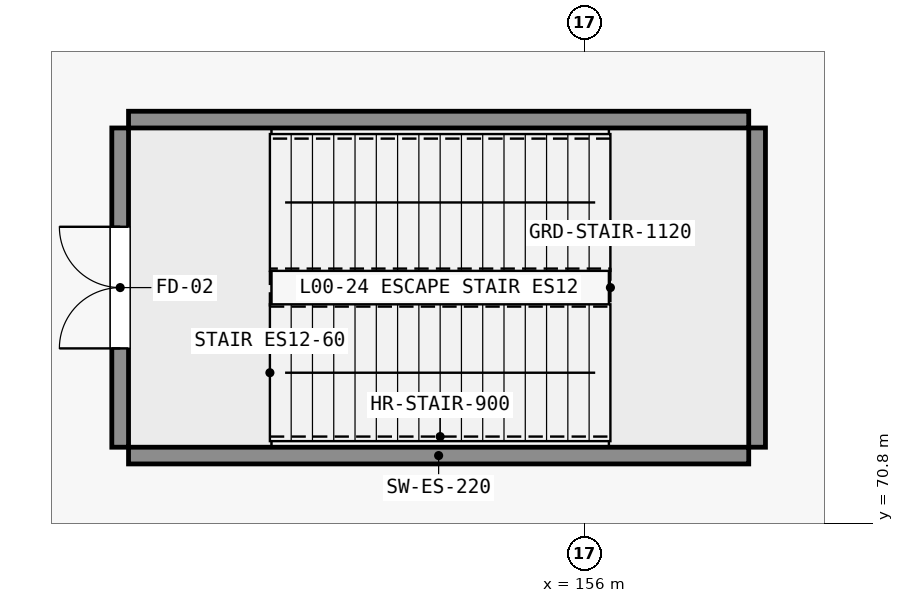
"""IFC4 building model, lengths in metres.
Left out: names, types, materials, properties, quantities, classifications, styles, units other than length and angle.
Written with IfcOpenShell. Run it as: python <this file> out.ifc"""

import sys

from ifc_helpers import new_model, si_unit, direction, frame, frame_2d, origin, place, context, subcontext, project, spatial, rectangle, extrude, element, fill, save


model = new_model("IFC4")
c1 = context("Model", 3, precision=1e-05, world=origin(), true_north=direction((0.0, 1.0)))
c2 = subcontext(c1, "Body", "Model", "MODEL_VIEW")
j1 = project(units=[si_unit("LENGTHUNIT", "METRE"), si_unit("PLANEANGLEUNIT", "RADIAN")], contexts=[c1])
p1 = place(None, origin())
s1 = spatial("IfcSite", under=j1, at=p1, CompositionType="ELEMENT")
p2 = place(p1, origin())
s2 = spatial("IfcBuilding", under=s1, at=p2, CompositionType="ELEMENT")
p3 = place(p2, origin())
s3 = spatial("IfcBuildingStorey", under=s2, at=p3, CompositionType="ELEMENT", Elevation=0.0)
for number, where, z_axis, x_axis in (
    (1, (150.0, 71.69, -0.45), (0.0, 0.0, 1.0), (1.0, 0.0, 0.0)),
    (2, (150.0, 76.11, -0.45), (0.0, 0.0, 1.0), (1.0, 0.0, 0.0)),
):
    element("IfcWall", number, at=place(p3, frame(where, z_axis=z_axis, x_axis=x_axis)), inside=s3, PredefinedType="SHEAR", context=c2, shape_type="SweptSolid", body=[
        extrude(rectangle(XDim=8.16, YDim=0.22, at=frame_2d((4.08, 0.0))), origin(), (0.0, 0.0, 1.0), 6.45),
    ])
p4 = place(p3, frame((149.89, 71.8, -0.45), z_axis=(0.0, 0.0, 1.0), x_axis=(0.0, 1.0, 0.0)))
e3 = element("IfcWall", 3, at=p4, inside=s3, PredefinedType="SHEAR", context=c2, shape_type="SweptSolid", body=[
    extrude(rectangle(XDim=4.2, YDim=0.22, at=frame_2d((2.1, 0.0))), origin(), (0.0, 0.0, 1.0), 6.45),
])
p5 = place(p4, frame((1.3, 0.0, 0.45)))
e4 = element("IfcOpeningElement", 4, at=p5, cuts=e3, PredefinedType="OPENING", context=c2, shape_type="SweptSolid", body=[
    extrude(rectangle(XDim=1.6, YDim=2.2, at=frame_2d((0.8, 1.1))), frame((0.0, 0.12, 0.0), z_axis=(0.0, -1.0, 0.0), x_axis=(1.0, 0.0, 0.0)), (0.0, 0.0, 1.0), 0.24),
])
p6 = place(p3, frame((158.27, 71.8, -0.45), z_axis=(0.0, 0.0, 1.0), x_axis=(0.0, 1.0, 0.0)))
e5 = element("IfcWall", 5, at=p6, inside=s3, PredefinedType="SHEAR", context=c2, shape_type="SweptSolid", body=[
    extrude(rectangle(XDim=4.2, YDim=0.22, at=frame_2d((2.1, 0.0))), origin(), (0.0, 0.0, 1.0), 6.45),
])
p7 = place(p5, origin())
e6 = element("IfcDoor", 6, at=p7, inside=s3, OperationType="DOUBLE_DOOR_SINGLE_SWING", PredefinedType="DOOR", context=c2, shape_type="SweptSolid", body=[
    extrude(rectangle(XDim=1.6, YDim=2.2, at=frame_2d((0.8, 1.1))), frame((0.0, 0.025, 0.0), z_axis=(0.0, -1.0, 0.0), x_axis=(1.0, 0.0, 0.0)), (0.0, 0.0, 1.0), 0.05),
])
fill(e4, e6)
save(model, sys.argv[1])
